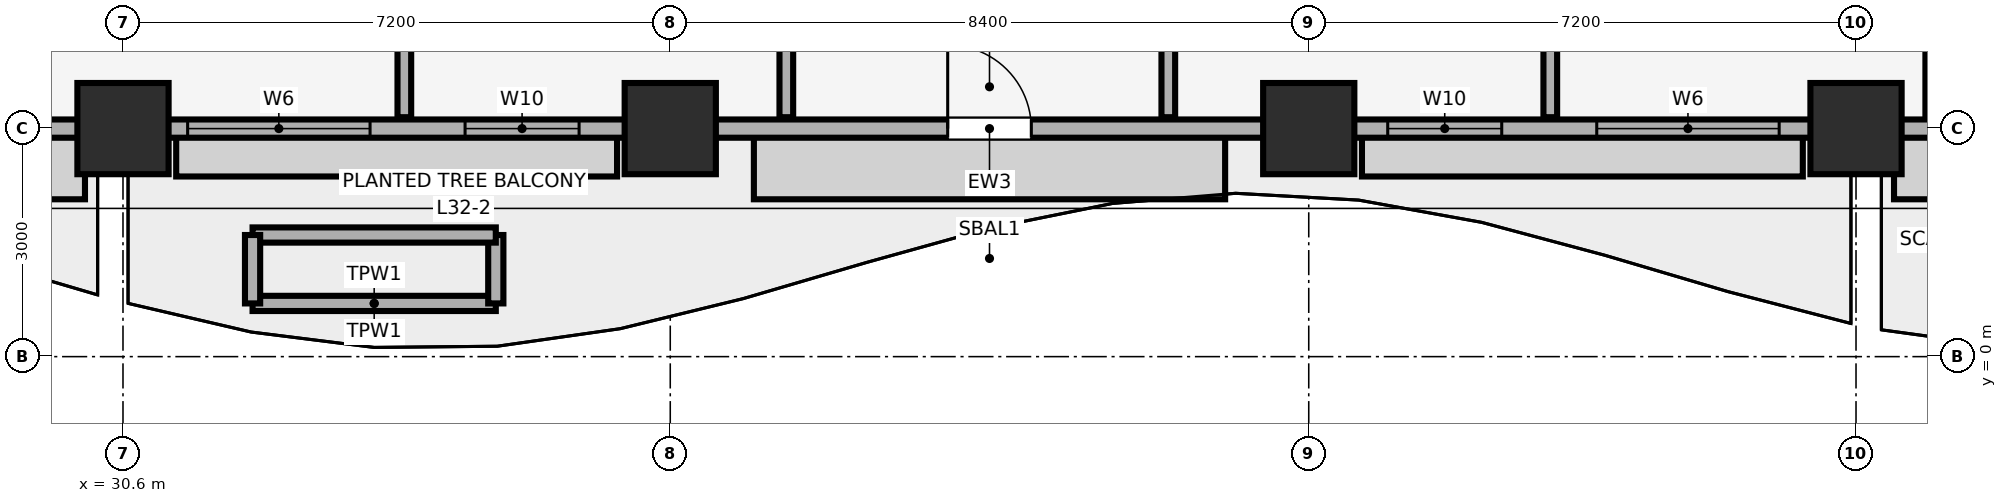
"""IFC4 building model, lengths in metres.
Left out: names, types, materials, properties, quantities, classifications, styles, units other than length and angle.
Written with IfcOpenShell. Run it as: python <this file> out.ifc"""

import sys

from ifc_helpers import new_model, si_unit, direction, frame, frame_2d, origin, origin_2d, place, context, subcontext, project, spatial, rectangle, extrude, element, fill, save


model = new_model("IFC4")
c1 = context("Model", 3, precision=1e-05, world=origin(), true_north=direction((0.0, 1.0)))
c2 = subcontext(c1, "Body", "Model", "MODEL_VIEW")
j1 = project(units=[si_unit("LENGTHUNIT", "METRE"), si_unit("PLANEANGLEUNIT", "RADIAN")], contexts=[c1])
p1 = place(None, origin())
s1 = spatial("IfcSite", under=j1, at=p1, CompositionType="ELEMENT")
p2 = place(p1, origin())
s2 = spatial("IfcBuilding", under=s1, at=p2, CompositionType="ELEMENT")
p3 = place(p2, frame((0.0, 0.0, 135.35)))
s3 = spatial("IfcBuildingStorey", under=s2, at=p3, CompositionType="ELEMENT", Elevation=135.35)
for number, where, z_axis, x_axis in (
    (1, (30.6, 3.0, 0.0), (0.0, 0.0, 1.0), (1.0, 0.0, 0.0)),
    (2, (37.8, 3.0, 0.0), (0.0, 0.0, 1.0), (1.0, 0.0, 0.0)),
    (3, (46.2, 3.0, 0.0), (0.0, 0.0, 1.0), (1.0, 0.0, 0.0)),
    (4, (53.4, 3.0, 0.0), (0.0, 0.0, 1.0), (1.0, 0.0, 0.0)),
):
    element("IfcColumn", number, at=place(p3, frame(where, z_axis=z_axis, x_axis=x_axis)), inside=s3, PredefinedType="COLUMN", context=c2, shape_type="SweptSolid", body=[
        extrude(rectangle(XDim=1.2, YDim=1.2, at=origin_2d()), origin(), (0.0, 0.0, 1.0), 3.56),
    ])
p4 = place(p3, frame((7.0, 3.0, 0.0), z_axis=(0.0, 0.0, 1.0), x_axis=(1.0, 0.0, 0.0)))
e5 = element("IfcWall", 5, at=p4, inside=s3, PredefinedType="SOLIDWALL", context=c2, shape_type="SweptSolid", body=[
    extrude(rectangle(XDim=70.0, YDim=0.24, at=frame_2d((35.0, 0.0))), origin(), (0.0, 0.0, 1.0), 2.61),
])
p5 = place(p4, frame((19.517, 0.0, 0.0)))
e6 = element("IfcOpeningElement", 6, at=p5, cuts=e5, PredefinedType="OPENING", context=c2, shape_type="SweptSolid", body=[
    extrude(rectangle(XDim=1.1, YDim=2.15, at=frame_2d((0.55, 1.075))), frame((0.0, 0.13, 0.0), z_axis=(0.0, -1.0, 0.0), x_axis=(1.0, 0.0, 0.0)), (0.0, 0.0, 1.0), 0.26),
])
p6 = place(p4, frame((34.45, 0.0, 0.0)))
e7 = element("IfcOpeningElement", 7, at=p6, cuts=e5, PredefinedType="OPENING", context=c2, shape_type="SweptSolid", body=[
    extrude(rectangle(XDim=1.1, YDim=2.15, at=frame_2d((0.55, 1.075))), frame((0.0, 0.13, 0.0), z_axis=(0.0, -1.0, 0.0), x_axis=(1.0, 0.0, 0.0)), (0.0, 0.0, 1.0), 0.26),
])
p7 = place(p4, frame((49.421, 0.0, 0.0)))
e8 = element("IfcOpeningElement", 8, at=p7, cuts=e5, PredefinedType="OPENING", context=c2, shape_type="SweptSolid", body=[
    extrude(rectangle(XDim=1.1, YDim=2.15, at=frame_2d((0.55, 1.075))), frame((0.0, 0.13, 0.0), z_axis=(0.0, -1.0, 0.0), x_axis=(1.0, 0.0, 0.0)), (0.0, 0.0, 1.0), 0.26),
])
p8 = place(p4, frame((5.2, 0.0, 0.85)))
e9 = element("IfcOpeningElement", 9, at=p8, cuts=e5, PredefinedType="OPENING", context=c2, shape_type="SweptSolid", body=[
    extrude(rectangle(XDim=1.5, YDim=1.4, at=frame_2d((0.75, 0.7))), frame((0.0, 0.13, 0.0), z_axis=(0.0, -1.0, 0.0), x_axis=(1.0, 0.0, 0.0)), (0.0, 0.0, 1.0), 0.26),
])
p9 = place(p4, frame((10.163, 0.0, 0.85)))
e10 = element("IfcOpeningElement", 10, at=p9, cuts=e5, PredefinedType="OPENING", context=c2, shape_type="SweptSolid", body=[
    extrude(rectangle(XDim=1.5, YDim=1.4, at=frame_2d((0.75, 0.7))), frame((0.0, 0.13, 0.0), z_axis=(0.0, -1.0, 0.0), x_axis=(1.0, 0.0, 0.0)), (0.0, 0.0, 1.0), 0.26),
])
p10 = place(p4, frame((12.913, 0.0, 0.85)))
e11 = element("IfcOpeningElement", 11, at=p10, cuts=e5, PredefinedType="OPENING", context=c2, shape_type="SweptSolid", body=[
    extrude(rectangle(XDim=2.4, YDim=1.5, at=frame_2d((1.2, 0.75))), frame((0.0, 0.13, 0.0), z_axis=(0.0, -1.0, 0.0), x_axis=(1.0, 0.0, 0.0)), (0.0, 0.0, 1.0), 0.26),
])
p11 = place(p4, frame((24.45, 0.0, 0.85)))
e12 = element("IfcOpeningElement", 12, at=p11, cuts=e5, PredefinedType="OPENING", context=c2, shape_type="SweptSolid", body=[
    extrude(rectangle(XDim=2.4, YDim=1.5, at=frame_2d((1.2, 0.75))), frame((0.0, 0.13, 0.0), z_axis=(0.0, -1.0, 0.0), x_axis=(1.0, 0.0, 0.0)), (0.0, 0.0, 1.0), 0.26),
])
p12 = place(p4, frame((28.101, 0.0, 0.85)))
e13 = element("IfcOpeningElement", 13, at=p12, cuts=e5, PredefinedType="OPENING", context=c2, shape_type="SweptSolid", body=[
    extrude(rectangle(XDim=1.5, YDim=1.4, at=frame_2d((0.75, 0.7))), frame((0.0, 0.13, 0.0), z_axis=(0.0, -1.0, 0.0), x_axis=(1.0, 0.0, 0.0)), (0.0, 0.0, 1.0), 0.26),
])
p13 = place(p4, frame((40.239, 0.0, 0.85)))
e14 = element("IfcOpeningElement", 14, at=p13, cuts=e5, PredefinedType="OPENING", context=c2, shape_type="SweptSolid", body=[
    extrude(rectangle(XDim=1.5, YDim=1.4, at=frame_2d((0.75, 0.7))), frame((0.0, 0.13, 0.0), z_axis=(0.0, -1.0, 0.0), x_axis=(1.0, 0.0, 0.0)), (0.0, 0.0, 1.0), 0.26),
])
p14 = place(p4, frame((42.989, 0.0, 0.85)))
e15 = element("IfcOpeningElement", 15, at=p14, cuts=e5, PredefinedType="OPENING", context=c2, shape_type="SweptSolid", body=[
    extrude(rectangle(XDim=2.4, YDim=1.5, at=frame_2d((1.2, 0.75))), frame((0.0, 0.13, 0.0), z_axis=(0.0, -1.0, 0.0), x_axis=(1.0, 0.0, 0.0)), (0.0, 0.0, 1.0), 0.26),
])
p15 = place(p4, frame((54.581, 0.0, 0.85)))
e16 = element("IfcOpeningElement", 16, at=p15, cuts=e5, PredefinedType="OPENING", context=c2, shape_type="SweptSolid", body=[
    extrude(rectangle(XDim=2.4, YDim=1.5, at=frame_2d((1.2, 0.75))), frame((0.0, 0.13, 0.0), z_axis=(0.0, -1.0, 0.0), x_axis=(1.0, 0.0, 0.0)), (0.0, 0.0, 1.0), 0.26),
])
p16 = place(p4, frame((58.23, 0.0, 0.85)))
e17 = element("IfcOpeningElement", 17, at=p16, cuts=e5, PredefinedType="OPENING", context=c2, shape_type="SweptSolid", body=[
    extrude(rectangle(XDim=1.5, YDim=1.4, at=frame_2d((0.75, 0.7))), frame((0.0, 0.13, 0.0), z_axis=(0.0, -1.0, 0.0), x_axis=(1.0, 0.0, 0.0)), (0.0, 0.0, 1.0), 0.26),
])
p17 = place(p4, frame((63.3, 0.0, 0.85)))
e18 = element("IfcOpeningElement", 18, at=p17, cuts=e5, PredefinedType="OPENING", context=c2, shape_type="SweptSolid", body=[
    extrude(rectangle(XDim=1.5, YDim=1.4, at=frame_2d((0.75, 0.7))), frame((0.0, 0.13, 0.0), z_axis=(0.0, -1.0, 0.0), x_axis=(1.0, 0.0, 0.0)), (0.0, 0.0, 1.0), 0.26),
])
p18 = place(p3, frame((32.305, 0.7, 0.0), z_axis=(0.0, 0.0, 1.0), x_axis=(1.0, 0.0, 0.0)))
e19 = element("IfcWall", 19, at=p18, inside=s3, PredefinedType="PARAPET", context=c2, shape_type="SweptSolid", body=[
    extrude(rectangle(XDim=3.2, YDim=0.2, at=frame_2d((1.6, 0.0))), origin(), (0.0, 0.0, 1.0), 0.55),
])
p19 = place(p3, frame((35.505, 0.7, 0.0), z_axis=(0.0, 0.0, 1.0), x_axis=(0.0, 1.0, 0.0)))
e20 = element("IfcWall", 20, at=p19, inside=s3, PredefinedType="PARAPET", context=c2, shape_type="SweptSolid", body=[
    extrude(rectangle(XDim=0.9, YDim=0.2, at=frame_2d((0.45, 0.0))), origin(), (0.0, 0.0, 1.0), 0.55),
])
p20 = place(p3, frame((35.505, 1.6, 0.0), z_axis=(0.0, 0.0, 1.0), x_axis=(-1.0, 0.0, 0.0)))
e21 = element("IfcWall", 21, at=p20, inside=s3, PredefinedType="PARAPET", context=c2, shape_type="SweptSolid", body=[
    extrude(rectangle(XDim=3.2, YDim=0.2, at=frame_2d((1.6, 0.0))), origin(), (0.0, 0.0, 1.0), 0.55),
])
p21 = place(p3, frame((32.305, 1.6, 0.0), z_axis=(0.0, 0.0, 1.0), x_axis=(0.0, -1.0, 0.0)))
e22 = element("IfcWall", 22, at=p21, inside=s3, PredefinedType="PARAPET", context=c2, shape_type="SweptSolid", body=[
    extrude(rectangle(XDim=0.9, YDim=0.2, at=frame_2d((0.45, 0.0))), origin(), (0.0, 0.0, 1.0), 0.55),
])
p22 = place(p3, frame((34.302, 3.15, 0.0), z_axis=(0.0, 0.0, 1.0), x_axis=(0.0, 1.0, 0.0)))
e23 = element("IfcWall", 23, at=p22, inside=s3, PredefinedType="PARTITIONING", context=c2, shape_type="SweptSolid", body=[
    extrude(rectangle(XDim=6.555, YDim=0.18, at=frame_2d((3.278, 0.0))), origin(), (0.0, 0.0, 1.0), 3.01),
])
for number, where, z_axis, x_axis in (
    (24, (39.327, 3.15, 0.0), (0.0, 0.0, 1.0), (0.0, 1.0, 0.0)),
    (25, (44.352, 3.15, 0.0), (0.0, 0.0, 1.0), (0.0, 1.0, 0.0)),
    (26, (49.378, 3.15, 0.0), (0.0, 0.0, 1.0), (0.0, 1.0, 0.0)),
    (27, (54.403, 3.15, 0.0), (0.0, 0.0, 1.0), (0.0, 1.0, 0.0)),
):
    element("IfcWall", number, at=place(p3, frame(where, z_axis=z_axis, x_axis=x_axis)), inside=s3, PredefinedType="PARTITIONING", context=c2, shape_type="SweptSolid", body=[
        extrude(rectangle(XDim=6.555, YDim=0.18, at=frame_2d((3.278, 0.0))), origin(), (0.0, 0.0, 1.0), 3.56),
    ])
p23 = place(p6, origin())
e28 = element("IfcDoor", 28, at=p23, inside=s3, OperationType="SINGLE_SWING_LEFT", PredefinedType="DOOR", context=c2, shape_type="SweptSolid", body=[
    extrude(rectangle(XDim=1.1, YDim=2.15, at=frame_2d((0.55, 1.075))), frame((0.0, 0.025, 0.0), z_axis=(0.0, -1.0, 0.0), x_axis=(1.0, 0.0, 0.0)), (0.0, 0.0, 1.0), 0.05),
])
fill(e7, e28)
p24 = place(p11, origin())
e29 = element("IfcWindow", 29, at=p24, inside=s3, PartitioningType="SINGLE_PANEL", PredefinedType="WINDOW", context=c2, shape_type="SweptSolid", body=[
    extrude(rectangle(XDim=2.4, YDim=1.5, at=frame_2d((1.2, 0.75))), frame((0.0, 0.03, 0.0), z_axis=(0.0, -1.0, 0.0), x_axis=(1.0, 0.0, 0.0)), (0.0, 0.0, 1.0), 0.06),
])
fill(e12, e29)
p25 = place(p12, origin())
e30 = element("IfcWindow", 30, at=p25, inside=s3, PartitioningType="SINGLE_PANEL", PredefinedType="WINDOW", context=c2, shape_type="SweptSolid", body=[
    extrude(rectangle(XDim=1.5, YDim=1.4, at=frame_2d((0.75, 0.7))), frame((0.0, 0.03, 0.0), z_axis=(0.0, -1.0, 0.0), x_axis=(1.0, 0.0, 0.0)), (0.0, 0.0, 1.0), 0.06),
])
fill(e13, e30)
p26 = place(p13, origin())
e31 = element("IfcWindow", 31, at=p26, inside=s3, PartitioningType="SINGLE_PANEL", PredefinedType="WINDOW", context=c2, shape_type="SweptSolid", body=[
    extrude(rectangle(XDim=1.5, YDim=1.4, at=frame_2d((0.75, 0.7))), frame((0.0, 0.03, 0.0), z_axis=(0.0, -1.0, 0.0), x_axis=(1.0, 0.0, 0.0)), (0.0, 0.0, 1.0), 0.06),
])
fill(e14, e31)
p27 = place(p14, origin())
e32 = element("IfcWindow", 32, at=p27, inside=s3, PartitioningType="SINGLE_PANEL", PredefinedType="WINDOW", context=c2, shape_type="SweptSolid", body=[
    extrude(rectangle(XDim=2.4, YDim=1.5, at=frame_2d((1.2, 0.75))), frame((0.0, 0.03, 0.0), z_axis=(0.0, -1.0, 0.0), x_axis=(1.0, 0.0, 0.0)), (0.0, 0.0, 1.0), 0.06),
])
fill(e15, e32)
save(model, sys.argv[1])
